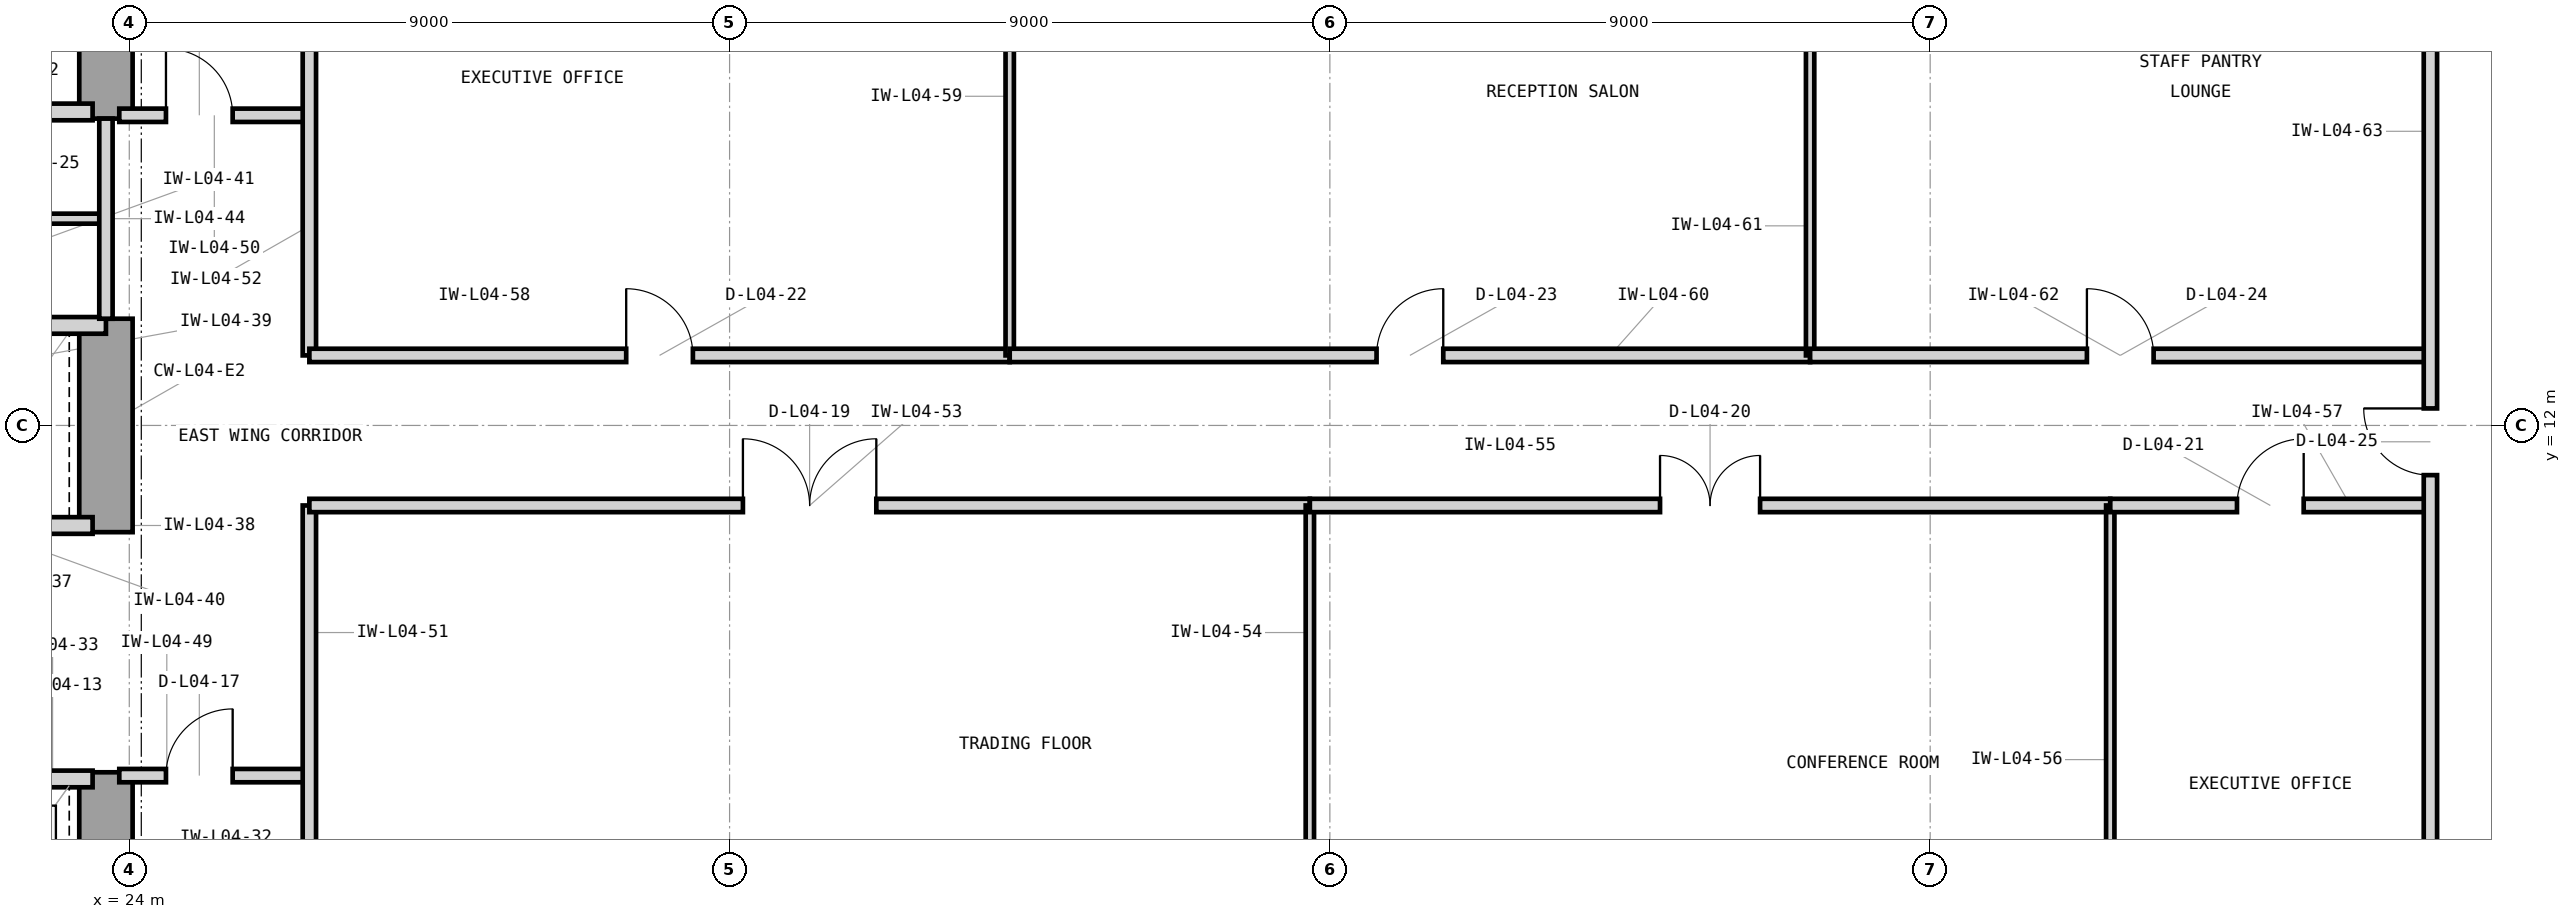
"""IFC4 building model, lengths in metres.
Left out: names, types, materials, properties, quantities, classifications, styles, units other than length and angle.
Written with IfcOpenShell. Run it as: python <this file> out.ifc"""

import sys

from ifc_helpers import new_model, si_unit, direction, frame, frame_2d, origin, place, context, subcontext, project, spatial, rectangle, extrude, element, fill, save


model = new_model("IFC4")
c1 = context("Model", 3, precision=1e-05, world=origin(), true_north=direction((0.0, 1.0)))
c2 = subcontext(c1, "Body", "Model", "MODEL_VIEW")
j1 = project(units=[si_unit("LENGTHUNIT", "METRE"), si_unit("PLANEANGLEUNIT", "RADIAN")], contexts=[c1])
p1 = place(None, origin())
s1 = spatial("IfcSite", under=j1, at=p1, CompositionType="ELEMENT")
p2 = place(p1, origin())
s2 = spatial("IfcBuilding", under=s1, at=p2, CompositionType="ELEMENT")
p3 = place(p2, frame((0.0, 0.0, 21.6)))
s3 = spatial("IfcBuildingStorey", under=s2, at=p3, CompositionType="ELEMENT", Elevation=21.6)
p4 = place(p3, frame((23.65, 3.75, 0.0), z_axis=(0.0, 0.0, 1.0), x_axis=(0.0, 1.0, 0.0)))
e1 = element("IfcWall", 1, at=p4, inside=s3, PredefinedType="SHEAR", context=c2, shape_type="SweptSolid", body=[
    extrude(rectangle(XDim=3.05, YDim=0.8, at=frame_2d((1.525, 0.0))), origin(), (0.0, 0.0, 1.0), 4.2),
])
p5 = place(p3, frame((23.65, 10.4, 0.0), z_axis=(0.0, 0.0, 1.0), x_axis=(0.0, 1.0, 0.0)))
e2 = element("IfcWall", 2, at=p5, inside=s3, PredefinedType="SHEAR", context=c2, shape_type="SweptSolid", body=[
    extrude(rectangle(XDim=3.2, YDim=0.8, at=frame_2d((1.6, 0.0))), origin(), (0.0, 0.0, 1.0), 4.2),
])
p6 = place(p3, frame((23.65, 16.6, 0.0), z_axis=(0.0, 0.0, 1.0), x_axis=(0.0, 1.0, 0.0)))
e3 = element("IfcWall", 3, at=p6, inside=s3, PredefinedType="SHEAR", context=c2, shape_type="SweptSolid", body=[
    extrude(rectangle(XDim=4.05, YDim=0.8, at=frame_2d((2.025, 0.0))), origin(), (0.0, 0.0, 1.0), 4.2),
])
p7 = place(p3, frame((21.05, 16.7, 0.0), z_axis=(0.0, 0.0, 1.0), x_axis=(1.0, 0.0, 0.0)))
e4 = element("IfcWall", 4, at=p7, inside=s3, PredefinedType="PARTITIONING", context=c2, shape_type="SweptSolid", body=[
    extrude(rectangle(XDim=2.4, YDim=0.25, at=frame_2d((1.2, 0.0))), origin(), (0.0, 0.0, 1.0), 3.426),
])
p8 = place(p3, frame((21.05, 6.7, 0.0), z_axis=(0.0, 0.0, 1.0), x_axis=(1.0, 0.0, 0.0)))
e5 = element("IfcWall", 5, at=p8, inside=s3, PredefinedType="PARTITIONING", context=c2, shape_type="SweptSolid", body=[
    extrude(rectangle(XDim=2.4, YDim=0.25, at=frame_2d((1.2, 0.0))), origin(), (0.0, 0.0, 1.0), 3.426),
])
p9 = place(p8, frame((0.48, 0.0, 0.0)))
e6 = element("IfcOpeningElement", 6, at=p9, cuts=e5, PredefinedType="OPENING", context=c2, shape_type="SweptSolid", body=[
    extrude(rectangle(XDim=1.15, YDim=2.25, at=frame_2d((0.575, 1.125))), frame((0.0, 0.135, 0.0), z_axis=(0.0, -1.0, 0.0), x_axis=(1.0, 0.0, 0.0)), (0.0, 0.0, 1.0), 0.27),
])
p10 = place(p3, frame((21.05, 10.5, 0.0), z_axis=(0.0, 0.0, 1.0), x_axis=(1.0, 0.0, 0.0)))
e7 = element("IfcWall", 7, at=p10, inside=s3, PredefinedType="PARTITIONING", context=c2, shape_type="SweptSolid", body=[
    extrude(rectangle(XDim=2.4, YDim=0.25, at=frame_2d((1.2, 0.0))), origin(), (0.0, 0.0, 1.0), 3.426),
])
p11 = place(p3, frame((14.7, 13.5, 0.0), z_axis=(0.0, 0.0, 1.0), x_axis=(1.0, 0.0, 0.0)))
e8 = element("IfcWall", 8, at=p11, inside=s3, PredefinedType="PARTITIONING", context=c2, shape_type="SweptSolid", body=[
    extrude(rectangle(XDim=8.95, YDim=0.25, at=frame_2d((4.475, 0.0))), origin(), (0.0, 0.0, 1.0), 3.426),
])
p12 = place(p3, frame((16.6, 15.1, 0.0), z_axis=(0.0, 0.0, 1.0), x_axis=(1.0, 0.0, 0.0)))
e9 = element("IfcWall", 9, at=p12, inside=s3, PredefinedType="PARTITIONING", context=c2, shape_type="SweptSolid", body=[
    extrude(rectangle(XDim=7.05, YDim=0.15, at=frame_2d((3.525, 0.0))), origin(), (0.0, 0.0, 1.0), 3.97),
])
p13 = place(p3, frame((23.65, 13.6, 0.0), z_axis=(0.0, 0.0, 1.0), x_axis=(0.0, 1.0, 0.0)))
e10 = element("IfcWall", 10, at=p13, inside=s3, PredefinedType="PARTITIONING", context=c2, shape_type="SweptSolid", body=[
    extrude(rectangle(XDim=3.0, YDim=0.2, at=frame_2d((1.5, 0.0))), origin(), (0.0, 0.0, 1.0), 3.97),
])
p14 = place(p3, frame((23.85, 6.75, 0.0), z_axis=(0.0, 0.0, 1.0), x_axis=(1.0, 0.0, 0.0)))
e11 = element("IfcWall", 11, at=p14, inside=s3, PredefinedType="PARTITIONING", context=c2, shape_type="SweptSolid", body=[
    extrude(rectangle(XDim=2.85, YDim=0.2, at=frame_2d((1.425, 0.0))), origin(), (0.0, 0.0, 1.0), 3.97),
])
p15 = place(p14, frame((0.7, 0.0, 0.0)))
e12 = element("IfcOpeningElement", 12, at=p15, cuts=e11, PredefinedType="OPENING", context=c2, shape_type="SweptSolid", body=[
    extrude(rectangle(XDim=1.0, YDim=2.15, at=frame_2d((0.5, 1.075))), frame((0.0, 0.11, 0.0), z_axis=(0.0, -1.0, 0.0), x_axis=(1.0, 0.0, 0.0)), (0.0, 0.0, 1.0), 0.22),
])
p16 = place(p3, frame((23.85, 16.65, 0.0), z_axis=(0.0, 0.0, 1.0), x_axis=(1.0, 0.0, 0.0)))
e13 = element("IfcWall", 13, at=p16, inside=s3, PredefinedType="PARTITIONING", context=c2, shape_type="SweptSolid", body=[
    extrude(rectangle(XDim=2.85, YDim=0.2, at=frame_2d((1.425, 0.0))), origin(), (0.0, 0.0, 1.0), 3.97),
])
p17 = place(p16, frame((0.7, 0.0, 0.0)))
e14 = element("IfcOpeningElement", 14, at=p17, cuts=e13, PredefinedType="OPENING", context=c2, shape_type="SweptSolid", body=[
    extrude(rectangle(XDim=1.0, YDim=2.15, at=frame_2d((0.5, 1.075))), frame((0.0, 0.11, 0.0), z_axis=(0.0, -1.0, 0.0), x_axis=(1.0, 0.0, 0.0)), (0.0, 0.0, 1.0), 0.22),
])
p18 = place(p3, frame((26.7, 3.18, 0.0), z_axis=(0.0, 0.0, 1.0), x_axis=(0.0, 1.0, 0.0)))
e15 = element("IfcWall", 15, at=p18, inside=s3, PredefinedType="PARTITIONING", context=c2, shape_type="SweptSolid", body=[
    extrude(rectangle(XDim=7.62, YDim=0.2, at=frame_2d((3.81, 0.0))), origin(), (0.0, 0.0, 1.0), 3.97),
])
p19 = place(p3, frame((26.7, 13.05, 0.0), z_axis=(0.0, 0.0, 1.0), x_axis=(0.0, 1.0, 0.0)))
e16 = element("IfcWall", 16, at=p19, inside=s3, PredefinedType="PARTITIONING", context=c2, shape_type="SweptSolid", body=[
    extrude(rectangle(XDim=7.77, YDim=0.2, at=frame_2d((3.885, 0.0))), origin(), (0.0, 0.0, 1.0), 3.97),
])
p20 = place(p3, frame((26.7, 10.8, 0.0), z_axis=(0.0, 0.0, 1.0), x_axis=(1.0, 0.0, 0.0)))
e17 = element("IfcWall", 17, at=p20, inside=s3, PredefinedType="PARTITIONING", context=c2, shape_type="SweptSolid", body=[
    extrude(rectangle(XDim=15.0, YDim=0.2, at=frame_2d((7.5, 0.0))), origin(), (0.0, 0.0, 1.0), 3.97),
])
p21 = place(p20, frame((6.5, 0.0, 0.0)))
e18 = element("IfcOpeningElement", 18, at=p21, cuts=e17, PredefinedType="OPENING", context=c2, shape_type="SweptSolid", body=[
    extrude(rectangle(XDim=2.0, YDim=2.5, at=frame_2d((1.0, 1.25))), frame((0.0, 0.11, 0.0), z_axis=(0.0, -1.0, 0.0), x_axis=(1.0, 0.0, 0.0)), (0.0, 0.0, 1.0), 0.22),
])
p22 = place(p3, frame((41.7, 3.18, 0.0), z_axis=(0.0, 0.0, 1.0), x_axis=(0.0, 1.0, 0.0)))
e19 = element("IfcWall", 19, at=p22, inside=s3, PredefinedType="PARTITIONING", context=c2, shape_type="SweptSolid", body=[
    extrude(rectangle(XDim=7.62, YDim=0.125, at=frame_2d((3.81, 0.0))), origin(), (0.0, 0.0, 1.0), 3.97),
])
p23 = place(p3, frame((41.7, 10.8, 0.0), z_axis=(0.0, 0.0, 1.0), x_axis=(1.0, 0.0, 0.0)))
e20 = element("IfcWall", 20, at=p23, inside=s3, PredefinedType="PARTITIONING", context=c2, shape_type="SweptSolid", body=[
    extrude(rectangle(XDim=12.0, YDim=0.2, at=frame_2d((6.0, 0.0))), origin(), (0.0, 0.0, 1.0), 3.97),
])
p24 = place(p23, frame((5.25, 0.0, 0.0)))
e21 = element("IfcOpeningElement", 21, at=p24, cuts=e20, PredefinedType="OPENING", context=c2, shape_type="SweptSolid", body=[
    extrude(rectangle(XDim=1.5, YDim=2.3, at=frame_2d((0.75, 1.15))), frame((0.0, 0.11, 0.0), z_axis=(0.0, -1.0, 0.0), x_axis=(1.0, 0.0, 0.0)), (0.0, 0.0, 1.0), 0.22),
])
p25 = place(p3, frame((53.7, 3.18, 0.0), z_axis=(0.0, 0.0, 1.0), x_axis=(0.0, 1.0, 0.0)))
e22 = element("IfcWall", 22, at=p25, inside=s3, PredefinedType="PARTITIONING", context=c2, shape_type="SweptSolid", body=[
    extrude(rectangle(XDim=7.62, YDim=0.125, at=frame_2d((3.81, 0.0))), origin(), (0.0, 0.0, 1.0), 3.97),
])
p26 = place(p3, frame((53.7, 10.8, 0.0), z_axis=(0.0, 0.0, 1.0), x_axis=(1.0, 0.0, 0.0)))
e23 = element("IfcWall", 23, at=p26, inside=s3, PredefinedType="PARTITIONING", context=c2, shape_type="SweptSolid", body=[
    extrude(rectangle(XDim=4.8, YDim=0.2, at=frame_2d((2.4, 0.0))), origin(), (0.0, 0.0, 1.0), 3.97),
])
p27 = place(p26, frame((1.9, 0.0, 0.0)))
e24 = element("IfcOpeningElement", 24, at=p27, cuts=e23, PredefinedType="OPENING", context=c2, shape_type="SweptSolid", body=[
    extrude(rectangle(XDim=1.0, YDim=2.15, at=frame_2d((0.5, 1.075))), frame((0.0, 0.11, 0.0), z_axis=(0.0, -1.0, 0.0), x_axis=(1.0, 0.0, 0.0)), (0.0, 0.0, 1.0), 0.22),
])
p28 = place(p3, frame((26.7, 13.05, 0.0), z_axis=(0.0, 0.0, 1.0), x_axis=(1.0, 0.0, 0.0)))
e25 = element("IfcWall", 25, at=p28, inside=s3, PredefinedType="PARTITIONING", context=c2, shape_type="SweptSolid", body=[
    extrude(rectangle(XDim=10.5, YDim=0.2, at=frame_2d((5.25, 0.0))), origin(), (0.0, 0.0, 1.0), 3.97),
])
p29 = place(p28, frame((4.75, 0.0, 0.0)))
e26 = element("IfcOpeningElement", 26, at=p29, cuts=e25, PredefinedType="OPENING", context=c2, shape_type="SweptSolid", body=[
    extrude(rectangle(XDim=1.0, YDim=2.15, at=frame_2d((0.5, 1.075))), frame((0.0, 0.11, 0.0), z_axis=(0.0, -1.0, 0.0), x_axis=(1.0, 0.0, 0.0)), (0.0, 0.0, 1.0), 0.22),
])
p30 = place(p3, frame((37.2, 13.05, 0.0), z_axis=(0.0, 0.0, 1.0), x_axis=(0.0, 1.0, 0.0)))
e27 = element("IfcWall", 27, at=p30, inside=s3, PredefinedType="PARTITIONING", context=c2, shape_type="SweptSolid", body=[
    extrude(rectangle(XDim=7.77, YDim=0.125, at=frame_2d((3.885, 0.0))), origin(), (0.0, 0.0, 1.0), 3.97),
])
p31 = place(p3, frame((37.2, 13.05, 0.0), z_axis=(0.0, 0.0, 1.0), x_axis=(1.0, 0.0, 0.0)))
e28 = element("IfcWall", 28, at=p31, inside=s3, PredefinedType="PARTITIONING", context=c2, shape_type="SweptSolid", body=[
    extrude(rectangle(XDim=12.0, YDim=0.2, at=frame_2d((6.0, 0.0))), origin(), (0.0, 0.0, 1.0), 3.97),
])
p32 = place(p31, frame((5.5, 0.0, 0.0)))
e29 = element("IfcOpeningElement", 29, at=p32, cuts=e28, PredefinedType="OPENING", context=c2, shape_type="SweptSolid", body=[
    extrude(rectangle(XDim=1.0, YDim=2.15, at=frame_2d((0.5, 1.075))), frame((0.0, 0.11, 0.0), z_axis=(0.0, -1.0, 0.0), x_axis=(1.0, 0.0, 0.0)), (0.0, 0.0, 1.0), 0.22),
])
p33 = place(p3, frame((49.2, 13.05, 0.0), z_axis=(0.0, 0.0, 1.0), x_axis=(0.0, 1.0, 0.0)))
e30 = element("IfcWall", 30, at=p33, inside=s3, PredefinedType="PARTITIONING", context=c2, shape_type="SweptSolid", body=[
    extrude(rectangle(XDim=7.77, YDim=0.125, at=frame_2d((3.885, 0.0))), origin(), (0.0, 0.0, 1.0), 3.97),
])
p34 = place(p3, frame((49.2, 13.05, 0.0), z_axis=(0.0, 0.0, 1.0), x_axis=(1.0, 0.0, 0.0)))
e31 = element("IfcWall", 31, at=p34, inside=s3, PredefinedType="PARTITIONING", context=c2, shape_type="SweptSolid", body=[
    extrude(rectangle(XDim=9.3, YDim=0.2, at=frame_2d((4.65, 0.0))), origin(), (0.0, 0.0, 1.0), 3.97),
])
p35 = place(p34, frame((4.15, 0.0, 0.0)))
e32 = element("IfcOpeningElement", 32, at=p35, cuts=e31, PredefinedType="OPENING", context=c2, shape_type="SweptSolid", body=[
    extrude(rectangle(XDim=1.0, YDim=2.15, at=frame_2d((0.5, 1.075))), frame((0.0, 0.11, 0.0), z_axis=(0.0, -1.0, 0.0), x_axis=(1.0, 0.0, 0.0)), (0.0, 0.0, 1.0), 0.22),
])
p36 = place(p3, frame((58.5, 3.18, 0.0), z_axis=(0.0, 0.0, 1.0), x_axis=(0.0, 1.0, 0.0)))
e33 = element("IfcWall", 33, at=p36, inside=s3, PredefinedType="PARTITIONING", context=c2, shape_type="SweptSolid", body=[
    extrude(rectangle(XDim=17.64, YDim=0.2, at=frame_2d((8.82, 0.0))), origin(), (0.0, 0.0, 1.0), 3.97),
])
p37 = place(p36, frame((8.075, 0.0, 0.0)))
e34 = element("IfcOpeningElement", 34, at=p37, cuts=e33, PredefinedType="OPENING", context=c2, shape_type="SweptSolid", body=[
    extrude(rectangle(XDim=1.0, YDim=2.15, at=frame_2d((0.5, 1.075))), frame((0.0, 0.11, 0.0), z_axis=(0.0, -1.0, 0.0), x_axis=(1.0, 0.0, 0.0)), (0.0, 0.0, 1.0), 0.22),
])
p38 = place(p15, origin())
e35 = element("IfcDoor", 35, at=p38, inside=s3, OperationType="SINGLE_SWING_RIGHT", PredefinedType="DOOR", context=c2, shape_type="SweptSolid", body=[
    extrude(rectangle(XDim=1.0, YDim=2.15, at=frame_2d((0.5, 1.075))), frame((0.0, 0.025, 0.0), z_axis=(0.0, -1.0, 0.0), x_axis=(1.0, 0.0, 0.0)), (0.0, 0.0, 1.0), 0.05),
])
fill(e12, e35)
p39 = place(p17, origin())
e36 = element("IfcDoor", 36, at=p39, inside=s3, OperationType="SINGLE_SWING_LEFT", PredefinedType="DOOR", context=c2, shape_type="SweptSolid", body=[
    extrude(rectangle(XDim=1.0, YDim=2.15, at=frame_2d((0.5, 1.075))), frame((0.0, 0.025, 0.0), z_axis=(0.0, -1.0, 0.0), x_axis=(1.0, 0.0, 0.0)), (0.0, 0.0, 1.0), 0.05),
])
fill(e14, e36)
p40 = place(p21, origin())
e37 = element("IfcDoor", 37, at=p40, inside=s3, OperationType="DOUBLE_DOOR_SINGLE_SWING", PredefinedType="DOOR", context=c2, shape_type="SweptSolid", body=[
    extrude(rectangle(XDim=2.0, YDim=2.5, at=frame_2d((1.0, 1.25))), frame((0.0, 0.025, 0.0), z_axis=(0.0, -1.0, 0.0), x_axis=(1.0, 0.0, 0.0)), (0.0, 0.0, 1.0), 0.05),
])
fill(e18, e37)
p41 = place(p24, origin())
e38 = element("IfcDoor", 38, at=p41, inside=s3, OperationType="DOUBLE_DOOR_SINGLE_SWING", PredefinedType="DOOR", context=c2, shape_type="SweptSolid", body=[
    extrude(rectangle(XDim=1.5, YDim=2.3, at=frame_2d((0.75, 1.15))), frame((0.0, 0.025, 0.0), z_axis=(0.0, -1.0, 0.0), x_axis=(1.0, 0.0, 0.0)), (0.0, 0.0, 1.0), 0.05),
])
fill(e21, e38)
p42 = place(p27, origin())
e39 = element("IfcDoor", 39, at=p42, inside=s3, OperationType="SINGLE_SWING_RIGHT", PredefinedType="DOOR", context=c2, shape_type="SweptSolid", body=[
    extrude(rectangle(XDim=1.0, YDim=2.15, at=frame_2d((0.5, 1.075))), frame((0.0, 0.025, 0.0), z_axis=(0.0, -1.0, 0.0), x_axis=(1.0, 0.0, 0.0)), (0.0, 0.0, 1.0), 0.05),
])
fill(e24, e39)
p43 = place(p29, origin())
e40 = element("IfcDoor", 40, at=p43, inside=s3, OperationType="SINGLE_SWING_LEFT", PredefinedType="DOOR", context=c2, shape_type="SweptSolid", body=[
    extrude(rectangle(XDim=1.0, YDim=2.15, at=frame_2d((0.5, 1.075))), frame((0.0, 0.025, 0.0), z_axis=(0.0, -1.0, 0.0), x_axis=(1.0, 0.0, 0.0)), (0.0, 0.0, 1.0), 0.05),
])
fill(e26, e40)
p44 = place(p32, origin())
e41 = element("IfcDoor", 41, at=p44, inside=s3, OperationType="SINGLE_SWING_RIGHT", PredefinedType="DOOR", context=c2, shape_type="SweptSolid", body=[
    extrude(rectangle(XDim=1.0, YDim=2.15, at=frame_2d((0.5, 1.075))), frame((0.0, 0.025, 0.0), z_axis=(0.0, -1.0, 0.0), x_axis=(1.0, 0.0, 0.0)), (0.0, 0.0, 1.0), 0.05),
])
fill(e29, e41)
p45 = place(p35, origin())
e42 = element("IfcDoor", 42, at=p45, inside=s3, OperationType="SINGLE_SWING_LEFT", PredefinedType="DOOR", context=c2, shape_type="SweptSolid", body=[
    extrude(rectangle(XDim=1.0, YDim=2.15, at=frame_2d((0.5, 1.075))), frame((0.0, 0.025, 0.0), z_axis=(0.0, -1.0, 0.0), x_axis=(1.0, 0.0, 0.0)), (0.0, 0.0, 1.0), 0.05),
])
fill(e32, e42)
p46 = place(p37, origin())
e43 = element("IfcDoor", 43, at=p46, inside=s3, OperationType="SINGLE_SWING_RIGHT", PredefinedType="DOOR", context=c2, shape_type="SweptSolid", body=[
    extrude(rectangle(XDim=1.0, YDim=2.15, at=frame_2d((0.5, 1.075))), frame((0.0, 0.025, 0.0), z_axis=(0.0, -1.0, 0.0), x_axis=(1.0, 0.0, 0.0)), (0.0, 0.0, 1.0), 0.05),
])
fill(e34, e43)
save(model, sys.argv[1])
